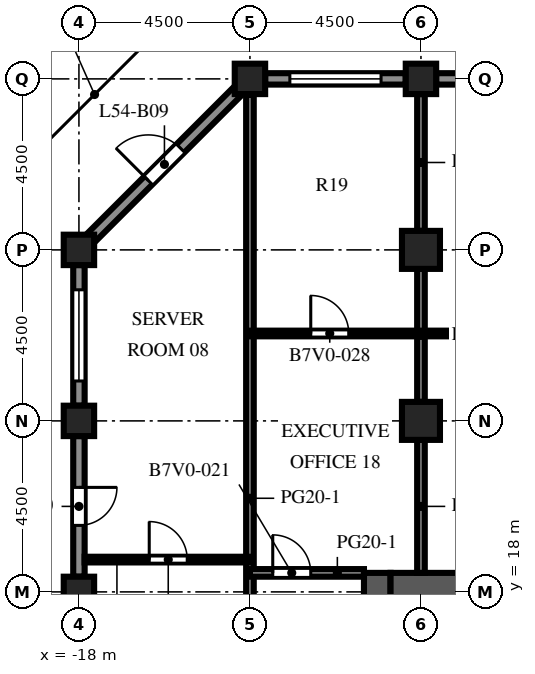
"""IFC4 building model, lengths in metres.
Left out: names, types, materials, properties, quantities, classifications, styles, units other than length and angle.
Written with IfcOpenShell. Run it as: python <this file> out.ifc"""

import sys

from ifc_helpers import new_model, si_unit, direction, frame, frame_2d, origin, origin_2d, place, context, subcontext, project, spatial, rectangle, extrude, element, fill, save


model = new_model("IFC4")
c1 = context("Model", 3, precision=1e-05, world=origin(), true_north=direction((0.0, 1.0)))
c2 = subcontext(c1, "Body", "Model", "MODEL_VIEW")
j1 = project(units=[si_unit("LENGTHUNIT", "METRE"), si_unit("PLANEANGLEUNIT", "RADIAN")], contexts=[c1])
p1 = place(None, origin())
s1 = spatial("IfcSite", under=j1, at=p1, CompositionType="ELEMENT")
p2 = place(p1, origin())
s2 = spatial("IfcBuilding", under=s1, at=p2, CompositionType="ELEMENT")
p3 = place(p2, frame((0.0, 0.0, 239.8)))
s3 = spatial("IfcBuildingStorey", under=s2, at=p3, CompositionType="ELEMENT", Elevation=239.8)
for number, where, z_axis, x_axis in (
    (1, (-18.0, 18.0, 0.0), (0.0, 0.0, 1.0), (1.0, 0.0, 0.0)),
    (2, (-18.0, 22.5, 0.0), (0.0, 0.0, 1.0), (1.0, 0.0, 0.0)),
    (3, (-18.0, 27.0, 0.0), (0.0, 0.0, 1.0), (1.0, 0.0, 0.0)),
    (4, (-13.5, 31.5, 0.0), (0.0, 0.0, 1.0), (1.0, 0.0, 0.0)),
    (5, (-9.0, 31.5, 0.0), (0.0, 0.0, 1.0), (1.0, 0.0, 0.0)),
):
    element("IfcColumn", number, at=place(p3, frame(where, z_axis=z_axis, x_axis=x_axis)), inside=s3, PredefinedType="COLUMN", context=c2, shape_type="SweptSolid", body=[
        extrude(rectangle(XDim=0.8, YDim=0.8, at=origin_2d()), origin(), (0.0, 0.0, 1.0), 4.1),
    ])
for number, where, z_axis, x_axis in (
    (6, (-9.0, 22.5, 0.0), (0.0, 0.0, 1.0), (1.0, 0.0, 0.0)),
    (7, (-9.0, 27.0, 0.0), (0.0, 0.0, 1.0), (1.0, 0.0, 0.0)),
):
    element("IfcColumn", number, at=place(p3, frame(where, z_axis=z_axis, x_axis=x_axis)), inside=s3, PredefinedType="COLUMN", context=c2, shape_type="SweptSolid", body=[
        extrude(rectangle(XDim=1.0, YDim=1.0, at=origin_2d()), origin(), (0.0, 0.0, 1.0), 4.1),
    ])
p4 = place(p3, frame((-10.15, -9.0, 0.0), z_axis=(0.0, 0.0, 1.0), x_axis=(0.0, 1.0, 0.0)))
e8 = element("IfcWall", 8, at=p4, inside=s3, PredefinedType="SHEAR", context=c2, shape_type="SweptSolid", body=[
    extrude(rectangle(XDim=27.5, YDim=0.7, at=frame_2d((13.75, 0.0))), origin(), (0.0, 0.0, 1.0), 4.1),
])
p5 = place(p4, frame((12.55, 0.0, 0.0)))
e9 = element("IfcOpeningElement", 9, at=p5, cuts=e8, PredefinedType="OPENING", context=c2, shape_type="SweptSolid", body=[
    extrude(rectangle(XDim=2.4, YDim=2.4, at=frame_2d((1.2, 1.2))), frame((0.0, 0.36, 0.0), z_axis=(0.0, -1.0, 0.0), x_axis=(1.0, 0.0, 0.0)), (0.0, 0.0, 1.0), 0.72),
])
p6 = place(p4, frame((6.825, 0.0, 0.0)))
e10 = element("IfcOpeningElement", 10, at=p6, cuts=e8, PredefinedType="OPENING", context=c2, shape_type="SweptSolid", body=[
    extrude(rectangle(XDim=1.2, YDim=2.1, at=frame_2d((0.6, 1.05))), frame((0.0, 0.36, 0.0), z_axis=(0.0, -1.0, 0.0), x_axis=(1.0, 0.0, 0.0)), (0.0, 0.0, 1.0), 0.72),
])
p7 = place(p4, frame((19.475, 0.0, 0.0)))
e11 = element("IfcOpeningElement", 11, at=p7, cuts=e8, PredefinedType="OPENING", context=c2, shape_type="SweptSolid", body=[
    extrude(rectangle(XDim=1.2, YDim=2.1, at=frame_2d((0.6, 1.05))), frame((0.0, 0.36, 0.0), z_axis=(0.0, -1.0, 0.0), x_axis=(1.0, 0.0, 0.0)), (0.0, 0.0, 1.0), 0.72),
])
p8 = place(p3, frame((-9.8, 18.15, 0.0), z_axis=(0.0, 0.0, 1.0), x_axis=(1.0, 0.0, 0.0)))
e12 = element("IfcWall", 12, at=p8, inside=s3, PredefinedType="SHEAR", context=c2, shape_type="SweptSolid", body=[
    extrude(rectangle(XDim=10.6, YDim=0.7, at=frame_2d((5.3, 0.0))), origin(), (0.0, 0.0, 1.0), 4.1),
])
p9 = place(p3, frame((-8.6, 31.5, 0.0), z_axis=(0.0, 0.0, 1.0), x_axis=(1.0, 0.0, 0.0)))
e13 = element("IfcWall", 13, at=p9, inside=s3, PredefinedType="SOLIDWALL", context=c2, shape_type="SweptSolid", body=[
    extrude(rectangle(XDim=3.7, YDim=0.3, at=frame_2d((1.85, 0.0))), origin(), (0.0, 0.0, 1.0), 2.85),
])
p10 = place(p9, frame((1.35, 0.0, 0.0)))
e14 = element("IfcOpeningElement", 14, at=p10, cuts=e13, PredefinedType="OPENING", context=c2, shape_type="SweptSolid", body=[
    extrude(rectangle(XDim=1.0, YDim=2.2, at=frame_2d((0.5, 1.1))), frame((0.0, 0.16, 0.0), z_axis=(0.0, -1.0, 0.0), x_axis=(1.0, 0.0, 0.0)), (0.0, 0.0, 1.0), 0.32),
])
p11 = place(p3, frame((-13.1, 31.5, 0.0), z_axis=(0.0, 0.0, 1.0), x_axis=(1.0, 0.0, 0.0)))
e15 = element("IfcWall", 15, at=p11, inside=s3, PredefinedType="SOLIDWALL", context=c2, shape_type="SweptSolid", body=[
    extrude(rectangle(XDim=3.7, YDim=0.3, at=frame_2d((1.85, 0.0))), origin(), (0.0, 0.0, 1.0), 2.85),
])
p12 = place(p11, frame((0.65, 0.0, 0.8)))
e16 = element("IfcOpeningElement", 16, at=p12, cuts=e15, PredefinedType="OPENING", context=c2, shape_type="SweptSolid", body=[
    extrude(rectangle(XDim=2.4, YDim=1.7, at=frame_2d((1.2, 0.85))), frame((0.0, 0.16, 0.0), z_axis=(0.0, -1.0, 0.0), x_axis=(1.0, 0.0, 0.0)), (0.0, 0.0, 1.0), 0.32),
])
p13 = place(p3, frame((-17.706, 27.294, 0.0), z_axis=(0.0, 0.0, 1.0), x_axis=(0.707106781187, 0.707106781187, 0.0)))
e17 = element("IfcWall", 17, at=p13, inside=s3, PredefinedType="SOLIDWALL", context=c2, shape_type="SweptSolid", body=[
    extrude(rectangle(XDim=5.532, YDim=0.3, at=frame_2d((2.766, 0.0))), origin(), (0.0, 0.0, 1.0), 2.85),
])
p14 = place(p13, frame((2.166, 0.0, 0.0)))
e18 = element("IfcOpeningElement", 18, at=p14, cuts=e17, PredefinedType="OPENING", context=c2, shape_type="SweptSolid", body=[
    extrude(rectangle(XDim=1.2, YDim=2.2, at=frame_2d((0.6, 1.1))), frame((0.0, 0.16, 0.0), z_axis=(0.0, -1.0, 0.0), x_axis=(1.0, 0.0, 0.0)), (0.0, 0.0, 1.0), 0.32),
])
p15 = place(p3, frame((-18.0, 22.9, 0.0), z_axis=(0.0, 0.0, 1.0), x_axis=(0.0, 1.0, 0.0)))
e19 = element("IfcWall", 19, at=p15, inside=s3, PredefinedType="SOLIDWALL", context=c2, shape_type="SweptSolid", body=[
    extrude(rectangle(XDim=3.7, YDim=0.3, at=frame_2d((1.85, 0.0))), origin(), (0.0, 0.0, 1.0), 2.85),
])
p16 = place(p15, frame((0.65, 0.0, 0.8)))
e20 = element("IfcOpeningElement", 20, at=p16, cuts=e19, PredefinedType="OPENING", context=c2, shape_type="SweptSolid", body=[
    extrude(rectangle(XDim=2.4, YDim=1.7, at=frame_2d((1.2, 0.85))), frame((0.0, 0.16, 0.0), z_axis=(0.0, -1.0, 0.0), x_axis=(1.0, 0.0, 0.0)), (0.0, 0.0, 1.0), 0.32),
])
p17 = place(p3, frame((-18.0, 18.4, 0.0), z_axis=(0.0, 0.0, 1.0), x_axis=(0.0, 1.0, 0.0)))
e21 = element("IfcWall", 21, at=p17, inside=s3, PredefinedType="SOLIDWALL", context=c2, shape_type="SweptSolid", body=[
    extrude(rectangle(XDim=3.7, YDim=0.3, at=frame_2d((1.85, 0.0))), origin(), (0.0, 0.0, 1.0), 2.85),
])
p18 = place(p17, frame((1.35, 0.0, 0.0)))
e22 = element("IfcOpeningElement", 22, at=p18, cuts=e21, PredefinedType="OPENING", context=c2, shape_type="SweptSolid", body=[
    extrude(rectangle(XDim=1.0, YDim=2.2, at=frame_2d((0.5, 1.1))), frame((0.0, 0.16, 0.0), z_axis=(0.0, -1.0, 0.0), x_axis=(1.0, 0.0, 0.0)), (0.0, 0.0, 1.0), 0.32),
])
p19 = place(p3, frame((-13.5, 6.25, 0.0), z_axis=(0.0, 0.0, 1.0), x_axis=(0.0, 1.0, 0.0)))
e23 = element("IfcWall", 23, at=p19, inside=s3, PredefinedType="PARTITIONING", context=c2, shape_type="SweptSolid", body=[
    extrude(rectangle(XDim=24.827, YDim=0.2, at=frame_2d((12.414, 0.0))), origin(), (0.0, 0.0, 1.0), 3.65),
])
p20 = place(p19, frame((2.6, 0.0, 0.0)))
e24 = element("IfcOpeningElement", 24, at=p20, cuts=e23, PredefinedType="OPENING", context=c2, shape_type="SweptSolid", body=[
    extrude(rectangle(XDim=1.0, YDim=2.1, at=frame_2d((0.5, 1.05))), frame((0.0, 0.11, 0.0), z_axis=(0.0, -1.0, 0.0), x_axis=(1.0, 0.0, 0.0)), (0.0, 0.0, 1.0), 0.22),
])
for number, where, z_axis, x_axis in (
    (25, (-9.0, 18.5, 0.0), (0.0, 0.0, 1.0), (0.0, 1.0, 0.0)),
    (26, (-9.0, 23.0, 0.0), (0.0, 0.0, 1.0), (0.0, 1.0, 0.0)),
):
    element("IfcWall", number, at=place(p3, frame(where, z_axis=z_axis, x_axis=x_axis)), inside=s3, PredefinedType="PARTITIONING", context=c2, shape_type="SweptSolid", body=[
        extrude(rectangle(XDim=3.5, YDim=0.2, at=frame_2d((1.75, 0.0))), origin(), (0.0, 0.0, 1.0), 3.65),
    ])
p21 = place(p3, frame((-9.0, 27.5, 0.0), z_axis=(0.0, 0.0, 1.0), x_axis=(0.0, 1.0, 0.0)))
e27 = element("IfcWall", 27, at=p21, inside=s3, PredefinedType="PARTITIONING", context=c2, shape_type="SweptSolid", body=[
    extrude(rectangle(XDim=3.6, YDim=0.2, at=frame_2d((1.8, 0.0))), origin(), (0.0, 0.0, 1.0), 3.65),
])
p22 = place(p3, frame((-13.5, 18.5, 0.0), z_axis=(0.0, 0.0, 1.0), x_axis=(1.0, 0.0, 0.0)))
e28 = element("IfcWall", 28, at=p22, inside=s3, PredefinedType="PARTITIONING", context=c2, shape_type="SweptSolid", body=[
    extrude(rectangle(XDim=3.0, YDim=0.2, at=frame_2d((1.5, 0.0))), origin(), (0.0, 0.0, 1.0), 3.65),
])
p23 = place(p22, frame((0.6, 0.0, 0.0)))
e29 = element("IfcOpeningElement", 29, at=p23, cuts=e28, PredefinedType="OPENING", context=c2, shape_type="SweptSolid", body=[
    extrude(rectangle(XDim=1.0, YDim=2.1, at=frame_2d((0.5, 1.05))), frame((0.0, 0.11, 0.0), z_axis=(0.0, -1.0, 0.0), x_axis=(1.0, 0.0, 0.0)), (0.0, 0.0, 1.0), 0.22),
])
p24 = place(p3, frame((-17.85, 18.85, 0.0), z_axis=(0.0, 0.0, 1.0), x_axis=(1.0, 0.0, 0.0)))
e30 = element("IfcWall", 30, at=p24, inside=s3, PredefinedType="PARTITIONING", context=c2, shape_type="SweptSolid", body=[
    extrude(rectangle(XDim=4.35, YDim=0.15, at=frame_2d((2.175, 0.0))), origin(), (0.0, 0.0, 1.0), 3.65),
])
p25 = place(p24, frame((1.7, 0.0, 0.0)))
e31 = element("IfcOpeningElement", 31, at=p25, cuts=e30, PredefinedType="OPENING", context=c2, shape_type="SweptSolid", body=[
    extrude(rectangle(XDim=1.0, YDim=2.1, at=frame_2d((0.5, 1.05))), frame((0.0, 0.085, 0.0), z_axis=(0.0, -1.0, 0.0), x_axis=(1.0, 0.0, 0.0)), (0.0, 0.0, 1.0), 0.17),
])
p26 = place(p3, frame((-13.5, 24.8, 0.0), z_axis=(0.0, 0.0, 1.0), x_axis=(1.0, 0.0, 0.0)))
e32 = element("IfcWall", 32, at=p26, inside=s3, PredefinedType="PARTITIONING", context=c2, shape_type="SweptSolid", body=[
    extrude(rectangle(XDim=34.5, YDim=0.15, at=frame_2d((17.25, 0.0))), origin(), (0.0, 0.0, 1.0), 3.65),
])
p27 = place(p26, frame((1.6, 0.0, 0.0)))
e33 = element("IfcOpeningElement", 33, at=p27, cuts=e32, PredefinedType="OPENING", context=c2, shape_type="SweptSolid", body=[
    extrude(rectangle(XDim=1.0, YDim=2.1, at=frame_2d((0.5, 1.05))), frame((0.0, 0.085, 0.0), z_axis=(0.0, -1.0, 0.0), x_axis=(1.0, 0.0, 0.0)), (0.0, 0.0, 1.0), 0.17),
])
p28 = place(p26, frame((10.35, 0.0, 0.0)))
e34 = element("IfcOpeningElement", 34, at=p28, cuts=e32, PredefinedType="OPENING", context=c2, shape_type="SweptSolid", body=[
    extrude(rectangle(XDim=1.0, YDim=2.1, at=frame_2d((0.5, 1.05))), frame((0.0, 0.085, 0.0), z_axis=(0.0, -1.0, 0.0), x_axis=(1.0, 0.0, 0.0)), (0.0, 0.0, 1.0), 0.17),
])
p29 = place(p26, frame((22.35, 0.0, 0.0)))
e35 = element("IfcOpeningElement", 35, at=p29, cuts=e32, PredefinedType="OPENING", context=c2, shape_type="SweptSolid", body=[
    extrude(rectangle(XDim=1.0, YDim=2.1, at=frame_2d((0.5, 1.05))), frame((0.0, 0.085, 0.0), z_axis=(0.0, -1.0, 0.0), x_axis=(1.0, 0.0, 0.0)), (0.0, 0.0, 1.0), 0.17),
])
p30 = place(p26, frame((31.1, 0.0, 0.0)))
e36 = element("IfcOpeningElement", 36, at=p30, cuts=e32, PredefinedType="OPENING", context=c2, shape_type="SweptSolid", body=[
    extrude(rectangle(XDim=1.0, YDim=2.1, at=frame_2d((0.5, 1.05))), frame((0.0, 0.085, 0.0), z_axis=(0.0, -1.0, 0.0), x_axis=(1.0, 0.0, 0.0)), (0.0, 0.0, 1.0), 0.17),
])
p31 = place(p12, origin())
e37 = element("IfcWindow", 37, at=p31, inside=s3, PartitioningType="SINGLE_PANEL", PredefinedType="WINDOW", context=c2, shape_type="SweptSolid", body=[
    extrude(rectangle(XDim=2.4, YDim=1.7, at=frame_2d((1.2, 0.85))), frame((0.0, 0.03, 0.0), z_axis=(0.0, -1.0, 0.0), x_axis=(1.0, 0.0, 0.0)), (0.0, 0.0, 1.0), 0.06),
])
fill(e16, e37)
p32 = place(p14, origin())
e38 = element("IfcDoor", 38, at=p32, inside=s3, OperationType="SINGLE_SWING_LEFT", PredefinedType="DOOR", context=c2, shape_type="SweptSolid", body=[
    extrude(rectangle(XDim=1.2, YDim=2.2, at=frame_2d((0.6, 1.1))), frame((0.0, 0.025, 0.0), z_axis=(0.0, -1.0, 0.0), x_axis=(1.0, 0.0, 0.0)), (0.0, 0.0, 1.0), 0.05),
])
fill(e18, e38)
p33 = place(p16, origin())
e39 = element("IfcWindow", 39, at=p33, inside=s3, PartitioningType="SINGLE_PANEL", PredefinedType="WINDOW", context=c2, shape_type="SweptSolid", body=[
    extrude(rectangle(XDim=2.4, YDim=1.7, at=frame_2d((1.2, 0.85))), frame((0.0, 0.03, 0.0), z_axis=(0.0, -1.0, 0.0), x_axis=(1.0, 0.0, 0.0)), (0.0, 0.0, 1.0), 0.06),
])
fill(e20, e39)
p34 = place(p18, origin())
e40 = element("IfcDoor", 40, at=p34, inside=s3, OperationType="SINGLE_SWING_RIGHT", PredefinedType="DOOR", context=c2, shape_type="SweptSolid", body=[
    extrude(rectangle(XDim=1.0, YDim=2.2, at=frame_2d((0.5, 1.1))), frame((0.0, 0.025, 0.0), z_axis=(0.0, -1.0, 0.0), x_axis=(1.0, 0.0, 0.0)), (0.0, 0.0, 1.0), 0.05),
])
fill(e22, e40)
p35 = place(p23, origin())
e41 = element("IfcDoor", 41, at=p35, inside=s3, OperationType="SINGLE_SWING_LEFT", PredefinedType="DOOR", context=c2, shape_type="SweptSolid", body=[
    extrude(rectangle(XDim=1.0, YDim=2.1, at=frame_2d((0.5, 1.05))), frame((0.0, 0.025, 0.0), z_axis=(0.0, -1.0, 0.0), x_axis=(1.0, 0.0, 0.0)), (0.0, 0.0, 1.0), 0.05),
])
fill(e29, e41)
p36 = place(p25, origin())
e42 = element("IfcDoor", 42, at=p36, inside=s3, OperationType="SINGLE_SWING_LEFT", PredefinedType="DOOR", context=c2, shape_type="SweptSolid", body=[
    extrude(rectangle(XDim=1.0, YDim=2.1, at=frame_2d((0.5, 1.05))), frame((0.0, 0.025, 0.0), z_axis=(0.0, -1.0, 0.0), x_axis=(1.0, 0.0, 0.0)), (0.0, 0.0, 1.0), 0.05),
])
fill(e31, e42)
p37 = place(p27, origin())
e43 = element("IfcDoor", 43, at=p37, inside=s3, OperationType="SINGLE_SWING_LEFT", PredefinedType="DOOR", context=c2, shape_type="SweptSolid", body=[
    extrude(rectangle(XDim=1.0, YDim=2.1, at=frame_2d((0.5, 1.05))), frame((0.0, 0.025, 0.0), z_axis=(0.0, -1.0, 0.0), x_axis=(1.0, 0.0, 0.0)), (0.0, 0.0, 1.0), 0.05),
])
fill(e33, e43)
save(model, sys.argv[1])
